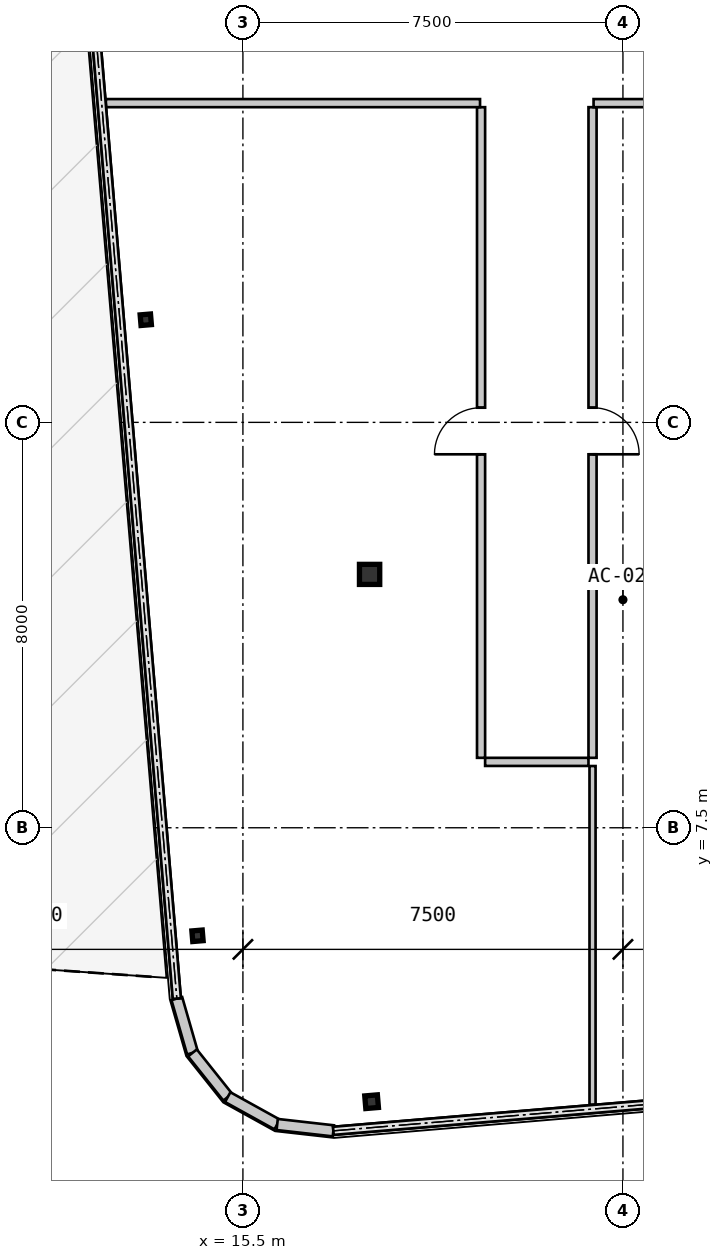
"""IFC4 building model, lengths in metres.
Left out: names, types, materials, properties, quantities, classifications, styles, units other than length and angle.
Written with IfcOpenShell. Run it as: python <this file> out.ifc"""

import sys

from ifc_helpers import new_model, si_unit, direction, frame, frame_2d, origin, origin_2d, place, context, subcontext, project, spatial, rectangle, hollow_rectangle, i_section, extrude, source, transform, mapped, element, fill, save


model = new_model("IFC4")
c1 = context("Model", 3, precision=1e-05, world=origin(), true_north=direction((0.0, 1.0)))
c2 = subcontext(c1, "Body", "Model", "MODEL_VIEW")
j1 = project(units=[si_unit("LENGTHUNIT", "METRE"), si_unit("PLANEANGLEUNIT", "RADIAN")], contexts=[c1])
p1 = place(None, origin())
s1 = spatial("IfcSite", under=j1, at=p1, CompositionType="ELEMENT")
p2 = place(p1, origin())
s2 = spatial("IfcBuilding", under=s1, at=p2, CompositionType="ELEMENT")
p3 = place(p2, frame((0.0, 0.0, 168.7)))
s3 = spatial("IfcBuildingStorey", under=s2, at=p3, CompositionType="ELEMENT", Elevation=168.7)
m1 = source(origin(), c2, "Body", "SweptSolid", [
    extrude(i_section(OverallWidth=0.4, OverallDepth=0.396, WebThickness=0.022, FlangeThickness=0.034, at=origin_2d()), origin(), (0.0, 0.0, 1.0), 3.85),
])
p4 = place(p3, frame((18.0, 12.5, 0.0), z_axis=(0.0, 0.0, 1.0), x_axis=(1.0, 0.0, 0.0)))
e1 = element("IfcColumn", 1, at=p4, inside=s3, PredefinedType="COLUMN", context=c2, shape_type="MappedRepresentation", body=[
    mapped(m1, transform((0.0, 0.0, 0.0), scale=1.0)),
])
m2 = source(origin(), c2, "Body", "SweptSolid", [
    extrude(hollow_rectangle(XDim=0.25, YDim=0.25, WallThickness=0.01, at=origin_2d()), origin(), (0.0, 0.0, 1.0), 3.85),
])
p5 = place(p3, frame((18.04, 2.094, 0.0), z_axis=(0.0, 0.0, 1.0), x_axis=(0.99649285925, 0.083677843332, 0.0)))
e2 = element("IfcColumn", 2, at=p5, inside=s3, PredefinedType="COLUMN", context=c2, shape_type="MappedRepresentation", body=[
    mapped(m2, transform((0.0, 0.0, 0.0), scale=1.0)),
])
m3 = source(origin(), c2, "Body", "SweptSolid", [
    extrude(i_section(OverallWidth=0.205, OverallDepth=0.21, WebThickness=0.009, FlangeThickness=0.014, at=origin_2d()), origin(), (0.0, 0.0, 1.0), 3.85),
])
for number, where, z_axis, x_axis in (
    (3, (14.604, 5.368, 0.0), (0.0, 0.0, 1.0), (0.996, 0.084, 0.0)),
    (4, (13.583, 17.525, 0.0), (0.0, 0.0, 1.0), (0.996, 0.084, 0.0)),
):
    element("IfcColumn", number, at=place(p3, frame(where, z_axis=z_axis, x_axis=x_axis)), inside=s3, PredefinedType="COLUMN", context=c2, shape_type="MappedRepresentation", body=[
        mapped(m3, transform((0.0, 0.0, 0.0), scale=1.0)),
    ])
m4 = source(origin(), c2, "Body", "SweptSolid", [
    extrude(rectangle(XDim=1.116, YDim=0.22, at=frame_2d((0.558, 0.0))), origin(), (0.0, 0.0, 1.0), 3.63),
])
for number, where, z_axis, x_axis in (
    (5, (14.196, 4.13, 0.0), (0.0, 0.0, 1.0), (0.277, -0.961, 0.0)),
    (6, (14.504, 3.057, 0.0), (0.0, 0.0, 1.0), (0.623, -0.782, 0.0)),
    (7, (15.2, 2.184, 0.0), (0.0, 0.0, 1.0), (0.875, -0.484, 0.0)),
    (8, (16.176, 1.644, 0.0), (0.0, 0.0, 1.0), (0.994, -0.112, 0.0)),
):
    element("IfcWall", number, at=place(p3, frame(where, z_axis=z_axis, x_axis=x_axis)), inside=s3, PredefinedType="SOLIDWALL", context=c2, shape_type="MappedRepresentation", body=[
        mapped(m4, transform((0.0, 0.0, 0.0), scale=1.0)),
    ])
m5 = source(origin(), c2, "Body", "SweptSolid", [
    extrude(rectangle(XDim=12.84, YDim=0.16, at=frame_2d((6.42, 0.0))), origin(), (0.0, 0.0, 1.0), 3.63),
])
p6 = place(p3, frame((20.2, 8.88, 0.0), z_axis=(0.0, 0.0, 1.0), x_axis=(0.0, 1.0, 0.0)))
e9 = element("IfcWall", 9, at=p6, inside=s3, PredefinedType="PARTITIONING", context=c2, shape_type="MappedRepresentation", body=[
    mapped(m5, transform((0.0, 0.0, 0.0), scale=1.0)),
])
m6 = source(origin(), c2, "Body", "SweptSolid", [
    extrude(rectangle(XDim=0.92, YDim=2.1, at=frame_2d((0.46, 1.05))), frame((0.0, 0.09, 0.0), z_axis=(0.0, -1.0, 0.0), x_axis=(1.0, 0.0, 0.0)), (0.0, 0.0, 1.0), 0.18),
])
p7 = place(p6, frame((5.99, 0.0, 0.0)))
e10 = element("IfcOpeningElement", 10, at=p7, cuts=e9, PredefinedType="OPENING", context=c2, shape_type="MappedRepresentation", body=[
    mapped(m6, transform((0.0, 0.0, 0.0), scale=1.0)),
])
m7 = source(origin(), c2, "Body", "SweptSolid", [
    extrude(rectangle(XDim=7.384, YDim=0.16, at=frame_2d((3.692, 0.0))), origin(), (0.0, 0.0, 1.0), 3.63),
])
p8 = place(p3, frame((20.18, 21.8, 0.0), z_axis=(0.0, 0.0, 1.0), x_axis=(-1.0, 0.0, 0.0)))
e11 = element("IfcWall", 11, at=p8, inside=s3, PredefinedType="PARTITIONING", context=c2, shape_type="MappedRepresentation", body=[
    mapped(m7, transform((0.0, 0.0, 0.0), scale=1.0)),
])
m8 = source(origin(), c2, "Body", "SweptSolid", [
    extrude(rectangle(XDim=2.04, YDim=0.16, at=frame_2d((1.02, 0.0))), origin(), (0.0, 0.0, 1.0), 3.63),
])
p9 = place(p3, frame((22.32, 8.8, 0.0), z_axis=(0.0, 0.0, 1.0), x_axis=(-1.0, 0.0, 0.0)))
e12 = element("IfcWall", 12, at=p9, inside=s3, PredefinedType="PARTITIONING", context=c2, shape_type="MappedRepresentation", body=[
    mapped(m8, transform((0.0, 0.0, 0.0), scale=1.0)),
])
p10 = place(p3, frame((22.4, 21.72, 0.0), z_axis=(0.0, 0.0, 1.0), x_axis=(0.0, -1.0, 0.0)))
e13 = element("IfcWall", 13, at=p10, inside=s3, PredefinedType="PARTITIONING", context=c2, shape_type="MappedRepresentation", body=[
    mapped(m5, transform((0.0, 0.0, 0.0), scale=1.0)),
])
p11 = place(p10, frame((5.93, 0.0, 0.0)))
e14 = element("IfcOpeningElement", 14, at=p11, cuts=e13, PredefinedType="OPENING", context=c2, shape_type="MappedRepresentation", body=[
    mapped(m6, transform((0.0, 0.0, 0.0), scale=1.0)),
])
m9 = source(origin(), c2, "Body", "SweptSolid", [
    extrude(rectangle(XDim=12.559, YDim=0.16, at=frame_2d((6.28, 0.0))), origin(), (0.0, 0.0, 1.0), 3.63),
])
p12 = place(p3, frame((34.98, 21.8, 0.0), z_axis=(0.0, 0.0, 1.0), x_axis=(-1.0, 0.0, 0.0)))
e15 = element("IfcWall", 15, at=p12, inside=s3, PredefinedType="PARTITIONING", context=c2, shape_type="MappedRepresentation", body=[
    mapped(m9, transform((0.0, 0.0, 0.0), scale=1.0)),
])
m10 = source(origin(), c2, "Body", "SweptSolid", [
    extrude(rectangle(XDim=6.684, YDim=0.12, at=frame_2d((3.342, 0.0))), origin(), (0.0, 0.0, 1.0), 3.63),
])
p13 = place(p3, frame((22.4, 8.718, 0.0), z_axis=(0.0, 0.0, 1.0), x_axis=(0.0, -1.0, 0.0)))
e16 = element("IfcWall", 16, at=p13, inside=s3, PredefinedType="PARTITIONING", context=c2, shape_type="MappedRepresentation", body=[
    mapped(m10, transform((0.0, 0.0, 0.0), scale=1.0)),
])
m11 = source(origin(), c2, "Body", "SweptSolid", [
    extrude(rectangle(XDim=0.92, YDim=2.1, at=frame_2d((0.46, 1.05))), frame((0.0, 0.025, 0.0), z_axis=(0.0, -1.0, 0.0), x_axis=(1.0, 0.0, 0.0)), (0.0, 0.0, 1.0), 0.05),
])
p14 = place(p7, origin())
e17 = element("IfcDoor", 17, at=p14, inside=s3, OperationType="SINGLE_SWING_LEFT", PredefinedType="DOOR", context=c2, shape_type="MappedRepresentation", body=[
    mapped(m11, transform((0.0, 0.0, 0.0), scale=1.0)),
])
fill(e10, e17)
p15 = place(p11, origin())
e18 = element("IfcDoor", 18, at=p15, inside=s3, OperationType="SINGLE_SWING_RIGHT", PredefinedType="DOOR", context=c2, shape_type="MappedRepresentation", body=[
    mapped(m11, transform((0.0, 0.0, 0.0), scale=1.0)),
])
fill(e14, e18)
save(model, sys.argv[1])
